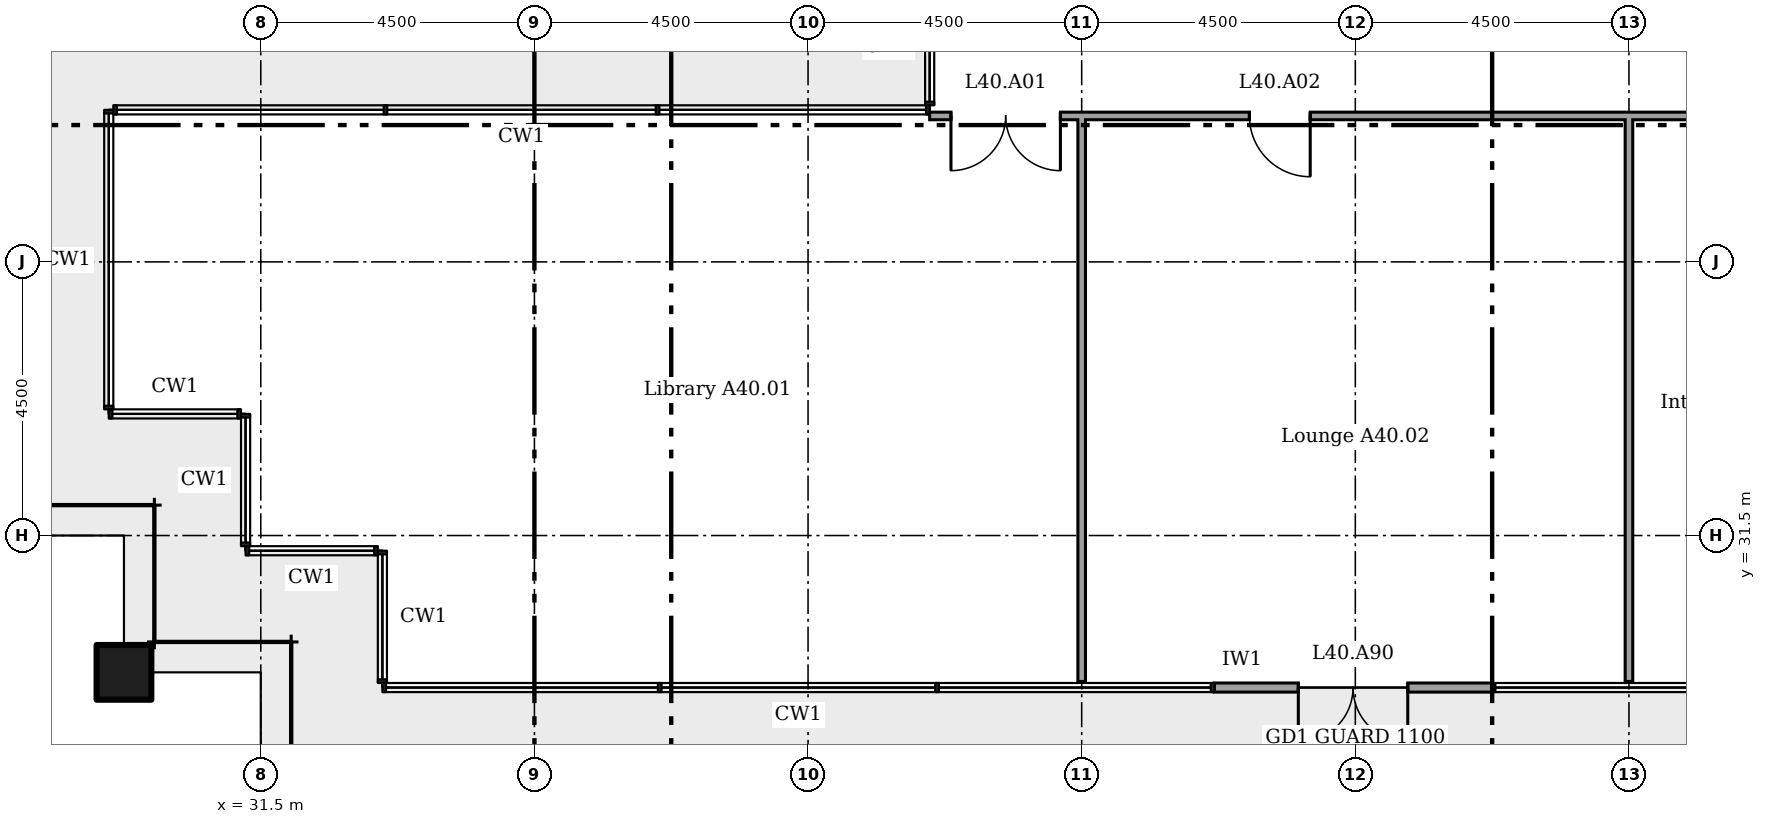
"""IFC4 building model, lengths in metres.
Left out: names, types, materials, properties, quantities, classifications, styles, units other than length and angle.
Written with IfcOpenShell. Run it as: python <this file> out.ifc"""

import sys

from ifc_helpers import new_model, si_unit, direction, frame, frame_2d, origin, origin_2d, place, context, subcontext, project, spatial, rectangle, extrude, element, fill, save


model = new_model("IFC4")
c1 = context("Model", 3, precision=1e-05, world=origin(), true_north=direction((0.0, 1.0)))
c2 = subcontext(c1, "Body", "Model", "MODEL_VIEW")
j1 = project(units=[si_unit("LENGTHUNIT", "METRE"), si_unit("PLANEANGLEUNIT", "RADIAN")], contexts=[c1])
p1 = place(None, origin())
s1 = spatial("IfcSite", under=j1, at=p1, CompositionType="ELEMENT")
p2 = place(p1, origin())
s2 = spatial("IfcBuilding", under=s1, at=p2, CompositionType="ELEMENT")
p3 = place(p2, frame((0.0, 0.0, 161.8)))
s3 = spatial("IfcBuildingStorey", under=s2, at=p3, CompositionType="ELEMENT", Elevation=161.8)
p4 = place(p3, frame((29.25, 29.25, 0.0)))
e1 = element("IfcColumn", 1, at=p4, inside=s3, PredefinedType="COLUMN", context=c2, shape_type="SweptSolid", body=[
    extrude(rectangle(XDim=0.9, YDim=0.9, at=origin_2d()), origin(), (0.0, 0.0, 1.0), 3.6),
])
p5 = place(p3, frame((47.182, 29.0, 0.0)))
e2 = element("IfcWall", 2, at=p5, inside=s3, PredefinedType="SOLIDWALL", context=c2, shape_type="SweptSolid", body=[
    extrude(rectangle(XDim=4.561, YDim=0.15, at=frame_2d((2.28, 0.0))), origin(), (0.0, 0.0, 1.0), 3.45),
])
p6 = place(p5, frame((1.38, 0.0, 0.0)))
e3 = element("IfcOpeningElement", 3, at=p6, cuts=e2, PredefinedType="OPENING", context=c2, shape_type="SweptSolid", body=[
    extrude(rectangle(XDim=1.8, YDim=2.4, at=frame_2d((0.9, 1.2))), frame((0.0, 0.085, 0.0), z_axis=(0.0, -1.0, 0.0), x_axis=(1.0, 0.0, 0.0)), (0.0, 0.0, 1.0), 0.17),
])
p7 = place(p3, frame((42.5, 38.4, 0.0)))
e4 = element("IfcWall", 4, at=p7, inside=s3, PredefinedType="PARTITIONING", context=c2, shape_type="SweptSolid", body=[
    extrude(rectangle(XDim=17.863, YDim=0.125, at=frame_2d((8.931, 0.0))), origin(), (0.0, 0.0, 1.0), 3.45),
])
p8 = place(p7, frame((0.35, 0.0, 0.0)))
e5 = element("IfcOpeningElement", 5, at=p8, cuts=e4, PredefinedType="OPENING", context=c2, shape_type="SweptSolid", body=[
    extrude(rectangle(XDim=1.8, YDim=2.1, at=frame_2d((0.9, 1.05))), frame((0.0, 0.073, 0.0), z_axis=(0.0, -1.0, 0.0), x_axis=(1.0, 0.0, 0.0)), (0.0, 0.0, 1.0), 0.145),
])
p9 = place(p7, frame((5.258, 0.0, 0.0)))
e6 = element("IfcOpeningElement", 6, at=p9, cuts=e4, PredefinedType="OPENING", context=c2, shape_type="SweptSolid", body=[
    extrude(rectangle(XDim=1.0, YDim=2.1, at=frame_2d((0.5, 1.05))), frame((0.0, 0.073, 0.0), z_axis=(0.0, -1.0, 0.0), x_axis=(1.0, 0.0, 0.0)), (0.0, 0.0, 1.0), 0.145),
])
for number, where, z_axis, x_axis in (
    (7, (45.0, 29.1, 0.0), (0.0, 0.0, 1.0), (0.0, 1.0, 0.0)),
    (8, (54.0, 29.1, 0.0), (0.0, 0.0, 1.0), (0.0, 1.0, 0.0)),
):
    element("IfcWall", number, at=place(p3, frame(where, z_axis=z_axis, x_axis=x_axis)), inside=s3, PredefinedType="PARTITIONING", context=c2, shape_type="SweptSolid", body=[
        extrude(rectangle(XDim=9.3, YDim=0.125, at=frame_2d((4.65, 0.0))), origin(), (0.0, 0.0, 1.0), 2.766),
    ])
p10 = place(p6, frame((1.8, 0.0, 0.0), x_axis=(-1.0, 0.0, 0.0)))
e9 = element("IfcDoor", 9, at=p10, inside=s3, OperationType="DOUBLE_DOOR_DOUBLE_SWING", PredefinedType="NOTDEFINED", context=c2, shape_type="SweptSolid", body=[
    extrude(rectangle(XDim=1.8, YDim=2.4, at=frame_2d((0.9, 1.2))), frame((0.0, 0.025, 0.0), z_axis=(0.0, -1.0, 0.0), x_axis=(1.0, 0.0, 0.0)), (0.0, 0.0, 1.0), 0.05),
])
fill(e3, e9)
p11 = place(p8, frame((1.8, 0.0, 0.0), x_axis=(-1.0, 0.0, 0.0)))
e10 = element("IfcDoor", 10, at=p11, inside=s3, OperationType="DOUBLE_DOOR_SINGLE_SWING", PredefinedType="DOOR", context=c2, shape_type="SweptSolid", body=[
    extrude(rectangle(XDim=1.8, YDim=2.1, at=frame_2d((0.9, 1.05))), frame((0.0, 0.025, 0.0), z_axis=(0.0, -1.0, 0.0), x_axis=(1.0, 0.0, 0.0)), (0.0, 0.0, 1.0), 0.05),
])
fill(e5, e10)
p12 = place(p9, frame((1.0, 0.0, 0.0), x_axis=(-1.0, 0.0, 0.0)))
e11 = element("IfcDoor", 11, at=p12, inside=s3, OperationType="SINGLE_SWING_RIGHT", PredefinedType="DOOR", context=c2, shape_type="SweptSolid", body=[
    extrude(rectangle(XDim=1.0, YDim=2.1, at=frame_2d((0.5, 1.05))), frame((0.0, 0.025, 0.0), z_axis=(0.0, -1.0, 0.0), x_axis=(1.0, 0.0, 0.0)), (0.0, 0.0, 1.0), 0.05),
])
fill(e6, e11)
save(model, sys.argv[1])
